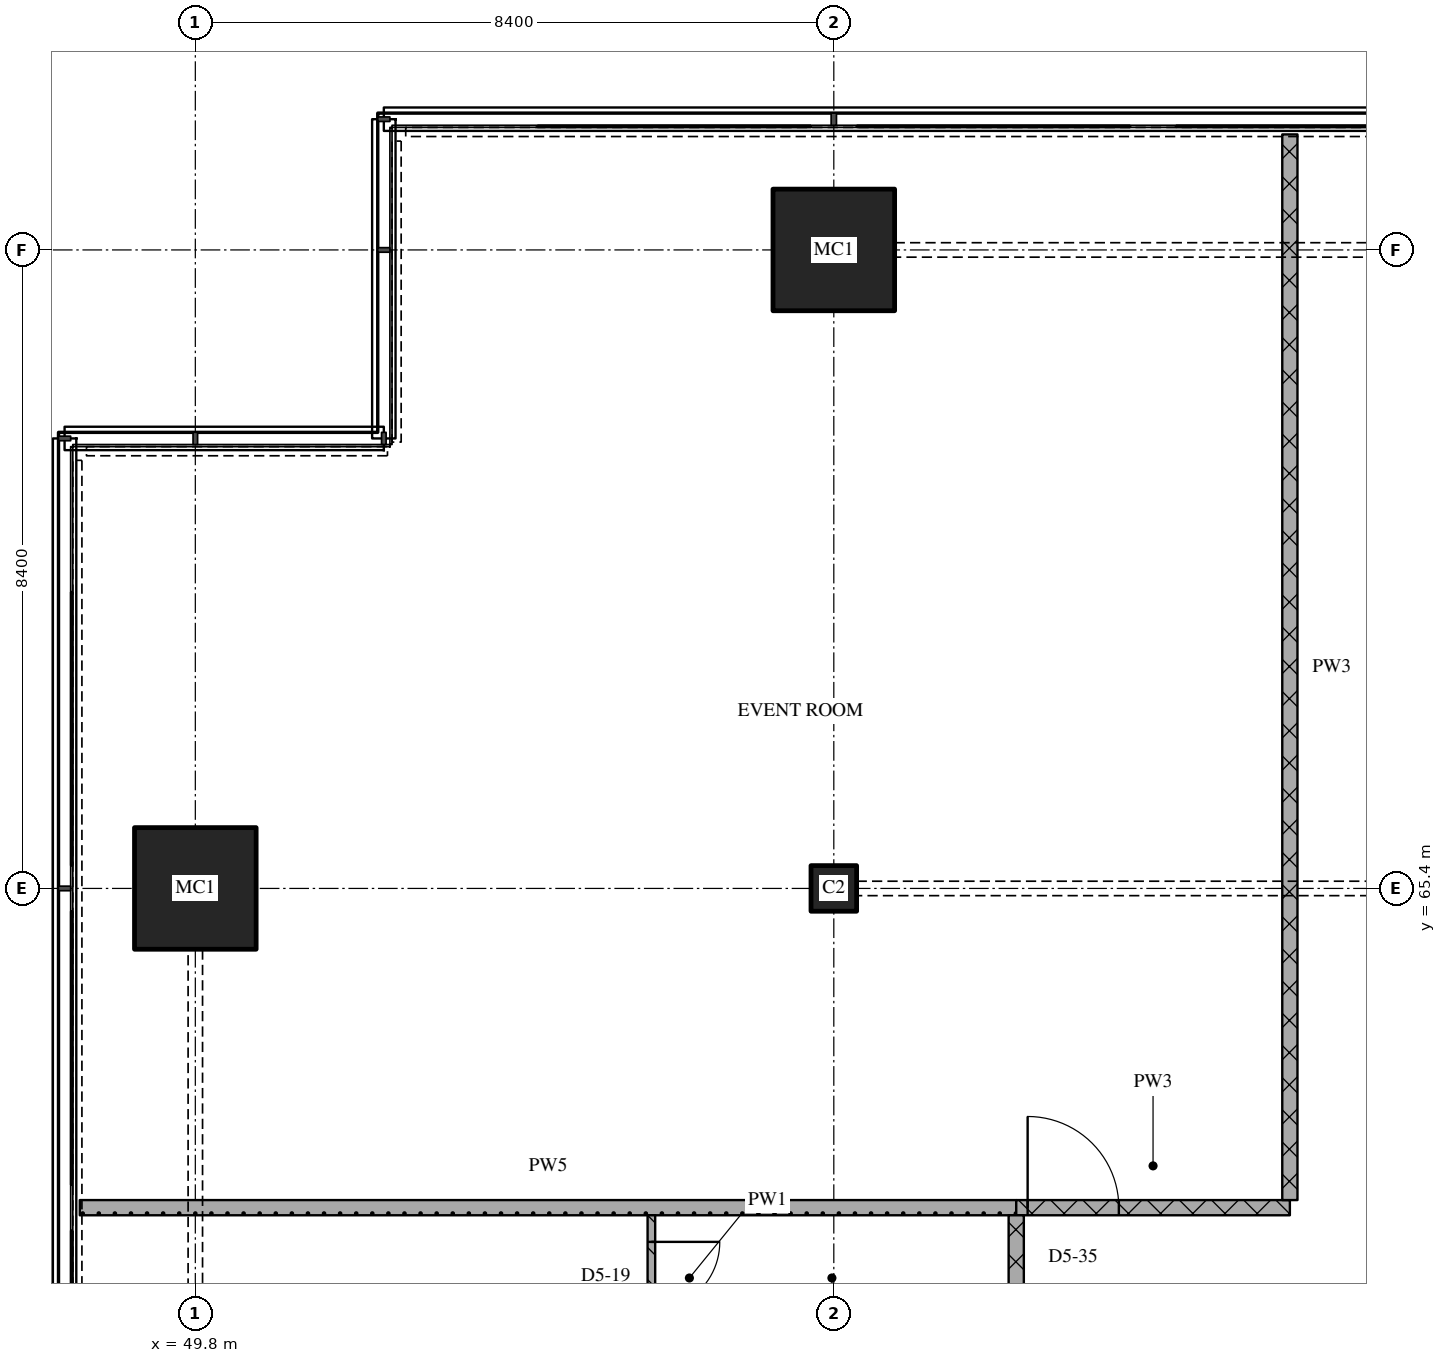
"""IFC4 building model, lengths in metres.
Left out: names, types, materials, properties, quantities, classifications, styles, units other than length and angle.
Written with IfcOpenShell. Run it as: python <this file> out.ifc"""

import sys

from ifc_helpers import new_model, si_unit, direction, frame, frame_2d, origin, origin_2d, place, context, subcontext, project, spatial, rectangle, extrude, element, fill, save


model = new_model("IFC4")
c1 = context("Model", 3, precision=1e-05, world=origin(), true_north=direction((0.0, 1.0)))
c2 = subcontext(c1, "Body", "Model", "MODEL_VIEW")
j1 = project(units=[si_unit("LENGTHUNIT", "METRE"), si_unit("PLANEANGLEUNIT", "RADIAN")], contexts=[c1])
p1 = place(None, origin())
s1 = spatial("IfcSite", under=j1, at=p1, CompositionType="ELEMENT")
p2 = place(p1, origin())
s2 = spatial("IfcBuilding", under=s1, at=p2, CompositionType="ELEMENT")
p3 = place(p2, frame((0.0, 0.0, 248.7)))
s3 = spatial("IfcBuildingStorey", under=s2, at=p3, CompositionType="ELEMENT", Elevation=248.7)
p4 = place(p3, frame((49.8, 65.4, 0.0), z_axis=(0.0, 0.0, 1.0), x_axis=(1.0, 0.0, 0.0)))
e1 = element("IfcColumn", 1, at=p4, inside=s3, PredefinedType="COLUMN", context=c2, shape_type="SweptSolid", body=[
    extrude(rectangle(XDim=1.6, YDim=1.6, at=origin_2d()), origin(), (0.0, 0.0, 1.0), 3.6),
])
p5 = place(p3, frame((58.2, 65.4, 0.0), z_axis=(0.0, 0.0, 1.0), x_axis=(1.0, 0.0, 0.0)))
e2 = element("IfcColumn", 2, at=p5, inside=s3, PredefinedType="COLUMN", context=c2, shape_type="SweptSolid", body=[
    extrude(rectangle(XDim=0.6, YDim=0.6, at=origin_2d()), origin(), (0.0, 0.0, 1.0), 3.6),
])
p6 = place(p3, frame((58.2, 73.8, 0.0), z_axis=(0.0, 0.0, 1.0), x_axis=(1.0, 0.0, 0.0)))
e3 = element("IfcColumn", 3, at=p6, inside=s3, PredefinedType="COLUMN", context=c2, shape_type="SweptSolid", body=[
    extrude(rectangle(XDim=1.6, YDim=1.6, at=origin_2d()), origin(), (0.0, 0.0, 1.0), 3.6),
])
p7 = place(p3, frame((60.6, 61.2, 0.0), z_axis=(0.0, 0.0, 1.0), x_axis=(1.0, 0.0, 0.0)))
e4 = element("IfcWall", 4, at=p7, inside=s3, PredefinedType="PARTITIONING", context=c2, shape_type="SweptSolid", body=[
    extrude(rectangle(XDim=3.6, YDim=0.2, at=frame_2d((1.8, 0.0))), origin(), (0.0, 0.0, 1.0), 3.3),
])
p8 = place(p7, frame((0.15, 0.0, 0.0)))
e5 = element("IfcOpeningElement", 5, at=p8, cuts=e4, PredefinedType="OPENING", context=c2, shape_type="SweptSolid", body=[
    extrude(rectangle(XDim=1.2, YDim=2.1, at=frame_2d((0.6, 1.05))), frame((0.0, 0.11, 0.0), z_axis=(0.0, -1.0, 0.0), x_axis=(1.0, 0.0, 0.0)), (0.0, 0.0, 1.0), 0.22),
])
p9 = place(p3, frame((48.28, 61.2, 0.0), z_axis=(0.0, 0.0, 1.0), x_axis=(1.0, 0.0, 0.0)))
e6 = element("IfcWall", 6, at=p9, inside=s3, PredefinedType="PARTITIONING", context=c2, shape_type="SweptSolid", body=[
    extrude(rectangle(XDim=12.32, YDim=0.2, at=frame_2d((6.16, 0.0))), origin(), (0.0, 0.0, 1.0), 3.3),
])
p10 = place(p3, frame((55.8, 61.1, 0.0), z_axis=(0.0, 0.0, 1.0), x_axis=(0.0, -1.0, 0.0)))
e7 = element("IfcWall", 7, at=p10, inside=s3, PredefinedType="PARTITIONING", context=c2, shape_type="SweptSolid", body=[
    extrude(rectangle(XDim=1.65, YDim=0.1, at=frame_2d((0.825, 0.0))), origin(), (0.0, 0.0, 1.0), 3.3),
])
p11 = place(p10, frame((0.35, 0.0, 0.0)))
e8 = element("IfcOpeningElement", 8, at=p11, cuts=e7, PredefinedType="OPENING", context=c2, shape_type="SweptSolid", body=[
    extrude(rectangle(XDim=0.9, YDim=2.1, at=frame_2d((0.45, 1.05))), frame((0.0, 0.06, 0.0), z_axis=(0.0, -1.0, 0.0), x_axis=(1.0, 0.0, 0.0)), (0.0, 0.0, 1.0), 0.12),
])
p12 = place(p3, frame((60.6, 43.3, 0.0), z_axis=(0.0, 0.0, 1.0), x_axis=(0.0, 1.0, 0.0)))
e9 = element("IfcWall", 9, at=p12, inside=s3, PredefinedType="PARTITIONING", context=c2, shape_type="SweptSolid", body=[
    extrude(rectangle(XDim=17.8, YDim=0.2, at=frame_2d((8.9, 0.0))), origin(), (0.0, 0.0, 1.0), 3.3),
])
p13 = place(p12, frame((7.35, 0.0, 0.0)))
e10 = element("IfcOpeningElement", 10, at=p13, cuts=e9, PredefinedType="OPENING", context=c2, shape_type="SweptSolid", body=[
    extrude(rectangle(XDim=1.0, YDim=2.1, at=frame_2d((0.5, 1.05))), frame((0.0, 0.11, 0.0), z_axis=(0.0, -1.0, 0.0), x_axis=(1.0, 0.0, 0.0)), (0.0, 0.0, 1.0), 0.22),
])
p14 = place(p3, frame((64.2, 75.32, 0.0), z_axis=(0.0, 0.0, 1.0), x_axis=(0.0, -1.0, 0.0)))
e11 = element("IfcWall", 11, at=p14, inside=s3, PredefinedType="PARTITIONING", context=c2, shape_type="SweptSolid", body=[
    extrude(rectangle(XDim=14.02, YDim=0.2, at=frame_2d((7.01, 0.0))), origin(), (0.0, 0.0, 1.0), 3.3),
])
p15 = place(p8, origin())
e12 = element("IfcDoor", 12, at=p15, inside=s3, OperationType="SINGLE_SWING_LEFT", PredefinedType="DOOR", context=c2, shape_type="SweptSolid", body=[
    extrude(rectangle(XDim=1.2, YDim=2.1, at=frame_2d((0.6, 1.05))), frame((0.0, 0.025, 0.0), z_axis=(0.0, -1.0, 0.0), x_axis=(1.0, 0.0, 0.0)), (0.0, 0.0, 1.0), 0.05),
])
fill(e5, e12)
p16 = place(p11, origin())
e13 = element("IfcDoor", 13, at=p16, inside=s3, OperationType="SINGLE_SWING_LEFT", PredefinedType="DOOR", context=c2, shape_type="SweptSolid", body=[
    extrude(rectangle(XDim=0.9, YDim=2.1, at=frame_2d((0.45, 1.05))), frame((0.0, 0.025, 0.0), z_axis=(0.0, -1.0, 0.0), x_axis=(1.0, 0.0, 0.0)), (0.0, 0.0, 1.0), 0.05),
])
fill(e8, e13)
save(model, sys.argv[1])
